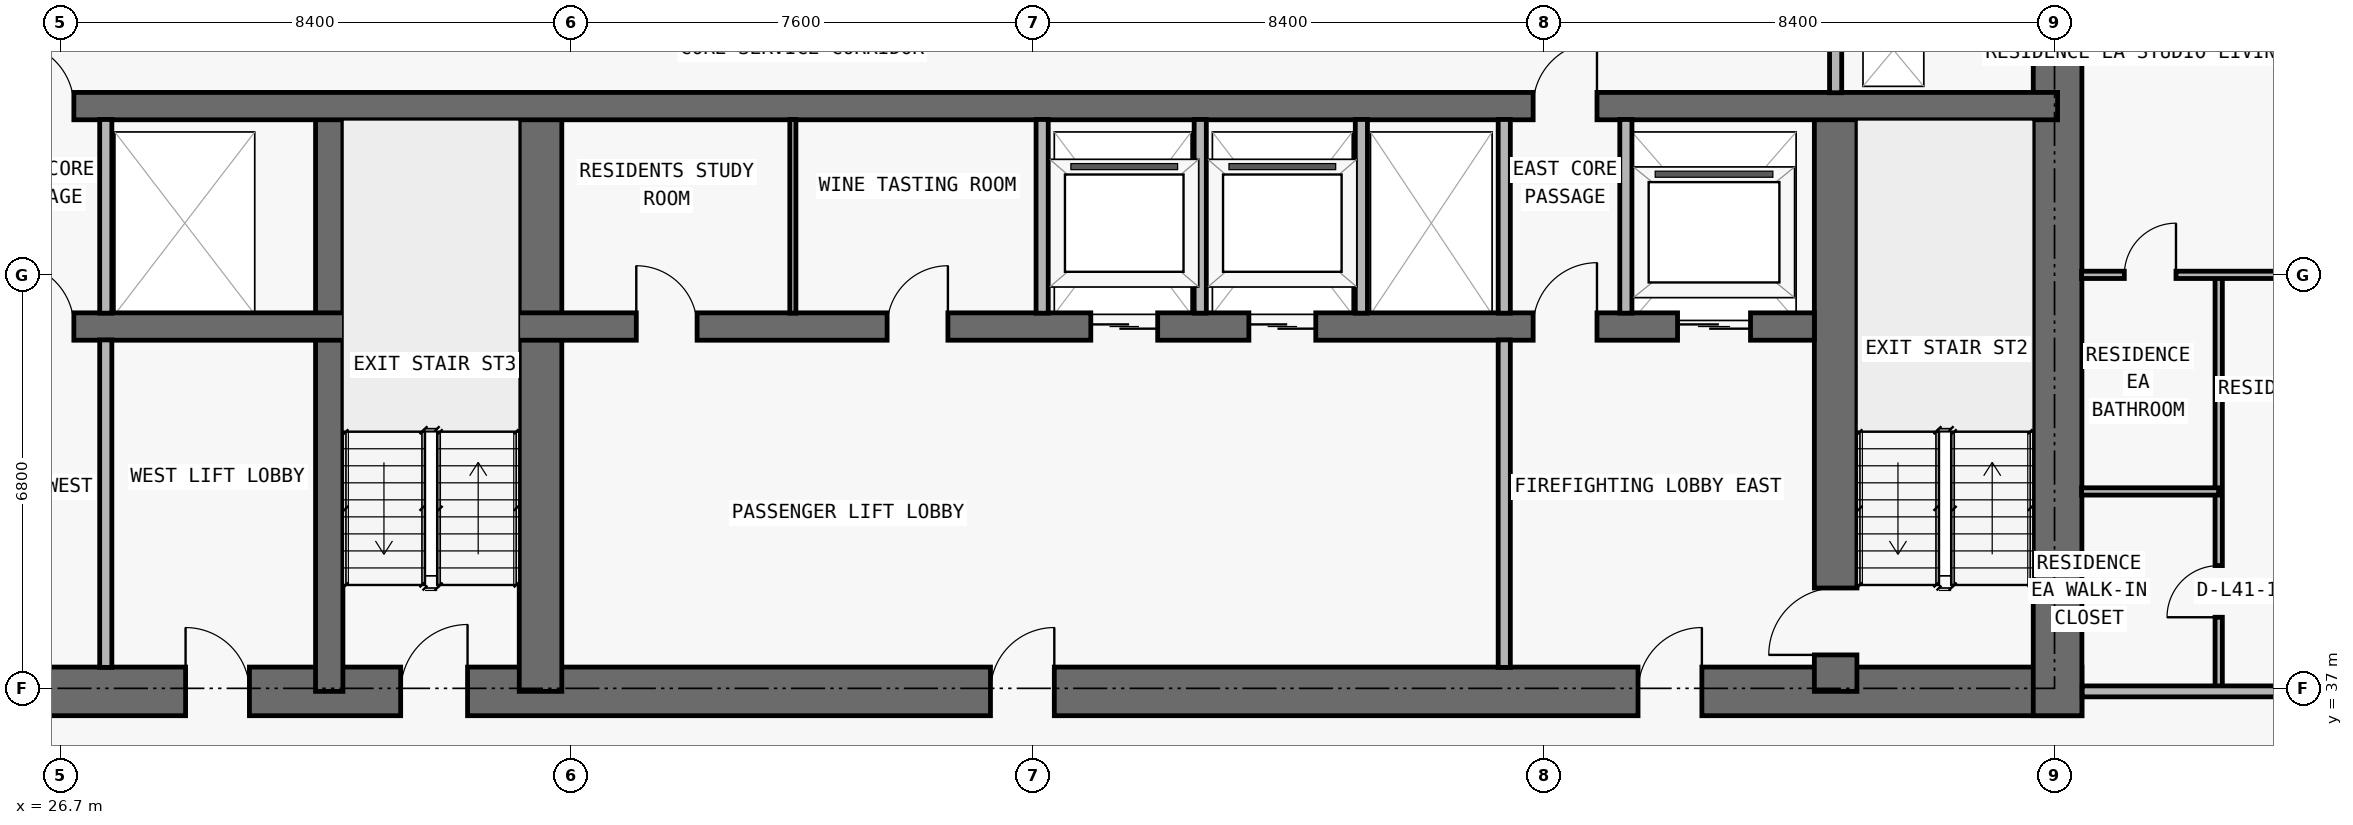
"""IFC4 building model, lengths in metres.
Left out: names, types, materials, properties, quantities, classifications, styles, units other than length and angle.
Written with IfcOpenShell. Run it as: python <this file> out.ifc"""

import sys

from ifc_helpers import new_model, si_unit, direction, frame, frame_2d, origin, place, context, subcontext, project, spatial, rectangle, extrude, element, fill, save


model = new_model("IFC4")
c1 = context("Model", 3, precision=1e-05, world=origin(), true_north=direction((0.0, 1.0)))
c2 = subcontext(c1, "Body", "Model", "MODEL_VIEW")
j1 = project(units=[si_unit("LENGTHUNIT", "METRE"), si_unit("PLANEANGLEUNIT", "RADIAN")], contexts=[c1])
p1 = place(None, origin())
s1 = spatial("IfcSite", under=j1, at=p1, CompositionType="ELEMENT")
p2 = place(p1, origin())
s2 = spatial("IfcBuilding", under=s1, at=p2, CompositionType="ELEMENT")
p3 = place(p2, frame((0.0, 0.0, 148.8)))
s3 = spatial("IfcBuildingStorey", under=s2, at=p3, CompositionType="ELEMENT", Elevation=148.8)
p4 = place(p3, frame((17.85, 36.95, 0.0), z_axis=(0.0, 0.0, 1.0), x_axis=(1.0, 0.0, 0.0)))
e1 = element("IfcWall", 1, at=p4, inside=s3, PredefinedType="SHEAR", context=c2, shape_type="SweptSolid", body=[
    extrude(rectangle(XDim=42.1, YDim=0.8, at=frame_2d((21.05, 0.0))), origin(), (0.0, 0.0, 1.0), 3.0),
])
p5 = place(p4, frame((14.45, 0.0, 0.0)))
e2 = element("IfcOpeningElement", 2, at=p5, cuts=e1, PredefinedType="OPENING", context=c2, shape_type="SweptSolid", body=[
    extrude(rectangle(XDim=1.1, YDim=2.15, at=frame_2d((0.55, 1.075))), frame((0.0, 0.41, 0.0), z_axis=(0.0, -1.0, 0.0), x_axis=(1.0, 0.0, 0.0)), (0.0, 0.0, 1.0), 0.82),
])
p6 = place(p4, frame((6.3, 0.0, 0.0)))
e3 = element("IfcOpeningElement", 3, at=p6, cuts=e1, PredefinedType="OPENING", context=c2, shape_type="SweptSolid", body=[
    extrude(rectangle(XDim=1.05, YDim=2.15, at=frame_2d((0.525, 1.075))), frame((0.0, 0.41, 0.0), z_axis=(0.0, -1.0, 0.0), x_axis=(1.0, 0.0, 0.0)), (0.0, 0.0, 1.0), 0.82),
])
p7 = place(p4, frame((34.8, 0.0, 0.0)))
e4 = element("IfcOpeningElement", 4, at=p7, cuts=e1, PredefinedType="OPENING", context=c2, shape_type="SweptSolid", body=[
    extrude(rectangle(XDim=1.05, YDim=2.15, at=frame_2d((0.525, 1.075))), frame((0.0, 0.41, 0.0), z_axis=(0.0, -1.0, 0.0), x_axis=(1.0, 0.0, 0.0)), (0.0, 0.0, 1.0), 0.82),
])
p8 = place(p4, frame((10.913, 0.0, 0.0)))
e5 = element("IfcOpeningElement", 5, at=p8, cuts=e1, PredefinedType="OPENING", context=c2, shape_type="SweptSolid", body=[
    extrude(rectangle(XDim=1.05, YDim=2.15, at=frame_2d((0.525, 1.075))), frame((0.0, 0.41, 0.0), z_axis=(0.0, -1.0, 0.0), x_axis=(1.0, 0.0, 0.0)), (0.0, 0.0, 1.0), 0.82),
])
p9 = place(p4, frame((24.15, 0.0, 0.0)))
e6 = element("IfcOpeningElement", 6, at=p9, cuts=e1, PredefinedType="OPENING", context=c2, shape_type="SweptSolid", body=[
    extrude(rectangle(XDim=1.05, YDim=2.15, at=frame_2d((0.525, 1.075))), frame((0.0, 0.41, 0.0), z_axis=(0.0, -1.0, 0.0), x_axis=(1.0, 0.0, 0.0)), (0.0, 0.0, 1.0), 0.82),
])
p10 = place(p3, frame((59.55, 36.55, 0.0), z_axis=(0.0, 0.0, 1.0), x_axis=(0.0, 1.0, 0.0)))
e7 = element("IfcWall", 7, at=p10, inside=s3, PredefinedType="SHEAR", context=c2, shape_type="SweptSolid", body=[
    extrude(rectangle(XDim=14.05, YDim=0.8, at=frame_2d((7.025, 0.0))), origin(), (0.0, 0.0, 1.0), 3.0),
])
p11 = place(p3, frame((55.9, 36.95, 0.0), z_axis=(0.0, 0.0, 1.0), x_axis=(0.0, 1.0, 0.0)))
e8 = element("IfcWall", 8, at=p11, inside=s3, PredefinedType="SHEAR", context=c2, shape_type="SweptSolid", body=[
    extrude(rectangle(XDim=9.625, YDim=0.7, at=frame_2d((4.812, 0.0))), origin(), (0.0, 0.0, 1.0), 3.0),
])
p12 = place(p11, frame((0.6, 0.0, 0.0)))
e9 = element("IfcOpeningElement", 9, at=p12, cuts=e8, PredefinedType="OPENING", context=c2, shape_type="SweptSolid", body=[
    extrude(rectangle(XDim=1.1, YDim=2.15, at=frame_2d((0.55, 1.075))), frame((0.0, 0.36, 0.0), z_axis=(0.0, -1.0, 0.0), x_axis=(1.0, 0.0, 0.0)), (0.0, 0.0, 1.0), 0.72),
])
p13 = place(p3, frame((31.125, 36.95, 0.0), z_axis=(0.0, 0.0, 1.0), x_axis=(0.0, 1.0, 0.0)))
e10 = element("IfcWall", 10, at=p13, inside=s3, PredefinedType="SHEAR", context=c2, shape_type="SweptSolid", body=[
    extrude(rectangle(XDim=9.625, YDim=0.45, at=frame_2d((4.812, 0.0))), origin(), (0.0, 0.0, 1.0), 3.0),
])
p14 = place(p3, frame((34.6, 36.95, 0.0), z_axis=(0.0, 0.0, 1.0), x_axis=(0.0, 1.0, 0.0)))
e11 = element("IfcWall", 11, at=p14, inside=s3, PredefinedType="SHEAR", context=c2, shape_type="SweptSolid", body=[
    extrude(rectangle(XDim=9.625, YDim=0.7, at=frame_2d((4.812, 0.0))), origin(), (0.0, 0.0, 1.0), 3.0),
])
p15 = place(p3, frame((22.25, 42.95, 0.0), z_axis=(0.0, 0.0, 1.0), x_axis=(1.0, 0.0, 0.0)))
e12 = element("IfcWall", 12, at=p15, inside=s3, PredefinedType="SHEAR", context=c2, shape_type="SweptSolid", body=[
    extrude(rectangle(XDim=33.3, YDim=0.45, at=frame_2d((16.65, 0.0))), origin(), (0.0, 0.0, 1.0), 3.0),
])
p16 = place(p15, frame((1.05, 0.0, 0.0)))
e13 = element("IfcOpeningElement", 13, at=p16, cuts=e12, PredefinedType="OPENING", context=c2, shape_type="SweptSolid", body=[
    extrude(rectangle(XDim=1.2, YDim=2.2, at=frame_2d((0.6, 1.1))), frame((0.0, 0.235, 0.0), z_axis=(0.0, -1.0, 0.0), x_axis=(1.0, 0.0, 0.0)), (0.0, 0.0, 1.0), 0.47),
])
p17 = place(p15, frame((31.05, 0.0, 0.0)))
e14 = element("IfcOpeningElement", 14, at=p17, cuts=e12, PredefinedType="OPENING", context=c2, shape_type="SweptSolid", body=[
    extrude(rectangle(XDim=1.2, YDim=2.2, at=frame_2d((0.6, 1.1))), frame((0.0, 0.235, 0.0), z_axis=(0.0, -1.0, 0.0), x_axis=(1.0, 0.0, 0.0)), (0.0, 0.0, 1.0), 0.47),
])
p18 = place(p15, frame((21.4, 0.0, 0.0)))
e15 = element("IfcOpeningElement", 15, at=p18, cuts=e12, PredefinedType="OPENING", context=c2, shape_type="SweptSolid", body=[
    extrude(rectangle(XDim=1.1, YDim=2.2, at=frame_2d((0.55, 1.1))), frame((0.0, 0.235, 0.0), z_axis=(0.0, -1.0, 0.0), x_axis=(1.0, 0.0, 0.0)), (0.0, 0.0, 1.0), 0.47),
])
p19 = place(p15, frame((24.0, 0.0, 0.0)))
e16 = element("IfcOpeningElement", 16, at=p19, cuts=e12, PredefinedType="OPENING", context=c2, shape_type="SweptSolid", body=[
    extrude(rectangle(XDim=1.1, YDim=2.2, at=frame_2d((0.55, 1.1))), frame((0.0, 0.235, 0.0), z_axis=(0.0, -1.0, 0.0), x_axis=(1.0, 0.0, 0.0)), (0.0, 0.0, 1.0), 0.47),
])
p20 = place(p15, frame((3.625, 0.0, 0.0)))
e17 = element("IfcOpeningElement", 17, at=p20, cuts=e12, PredefinedType="OPENING", context=c2, shape_type="SweptSolid", body=[
    extrude(rectangle(XDim=1.05, YDim=2.15, at=frame_2d((0.525, 1.075))), frame((0.0, 0.235, 0.0), z_axis=(0.0, -1.0, 0.0), x_axis=(1.0, 0.0, 0.0)), (0.0, 0.0, 1.0), 0.47),
])
p21 = place(p15, frame((28.675, 0.0, 0.0)))
e18 = element("IfcOpeningElement", 18, at=p21, cuts=e12, PredefinedType="OPENING", context=c2, shape_type="SweptSolid", body=[
    extrude(rectangle(XDim=1.05, YDim=2.15, at=frame_2d((0.525, 1.075))), frame((0.0, 0.235, 0.0), z_axis=(0.0, -1.0, 0.0), x_axis=(1.0, 0.0, 0.0)), (0.0, 0.0, 1.0), 0.47),
])
p22 = place(p15, frame((13.925, 0.0, 0.0)))
e19 = element("IfcOpeningElement", 19, at=p22, cuts=e12, PredefinedType="OPENING", context=c2, shape_type="SweptSolid", body=[
    extrude(rectangle(XDim=1.0, YDim=2.2, at=frame_2d((0.5, 1.1))), frame((0.0, 0.235, 0.0), z_axis=(0.0, -1.0, 0.0), x_axis=(1.0, 0.0, 0.0)), (0.0, 0.0, 1.0), 0.47),
])
p23 = place(p15, frame((18.05, 0.0, 0.0)))
e20 = element("IfcOpeningElement", 20, at=p23, cuts=e12, PredefinedType="OPENING", context=c2, shape_type="SweptSolid", body=[
    extrude(rectangle(XDim=1.0, YDim=2.2, at=frame_2d((0.5, 1.1))), frame((0.0, 0.235, 0.0), z_axis=(0.0, -1.0, 0.0), x_axis=(1.0, 0.0, 0.0)), (0.0, 0.0, 1.0), 0.47),
])
p24 = place(p3, frame((18.25, 46.575, 0.0), z_axis=(0.0, 0.0, 1.0), x_axis=(1.0, 0.0, 0.0)))
e21 = element("IfcWall", 21, at=p24, inside=s3, PredefinedType="SHEAR", context=c2, shape_type="SweptSolid", body=[
    extrude(rectangle(XDim=41.3, YDim=0.45, at=frame_2d((20.65, 0.0))), origin(), (0.0, 0.0, 1.0), 3.0),
])
p25 = place(p24, frame((7.625, 0.0, 0.0)))
e22 = element("IfcOpeningElement", 22, at=p25, cuts=e21, PredefinedType="OPENING", context=c2, shape_type="SweptSolid", body=[
    extrude(rectangle(XDim=1.05, YDim=2.15, at=frame_2d((0.525, 1.075))), frame((0.0, 0.235, 0.0), z_axis=(0.0, -1.0, 0.0), x_axis=(1.0, 0.0, 0.0)), (0.0, 0.0, 1.0), 0.47),
])
p26 = place(p24, frame((32.675, 0.0, 0.0)))
e23 = element("IfcOpeningElement", 23, at=p26, cuts=e21, PredefinedType="OPENING", context=c2, shape_type="SweptSolid", body=[
    extrude(rectangle(XDim=1.05, YDim=2.15, at=frame_2d((0.525, 1.075))), frame((0.0, 0.235, 0.0), z_axis=(0.0, -1.0, 0.0), x_axis=(1.0, 0.0, 0.0)), (0.0, 0.0, 1.0), 0.47),
])
p27 = place(p3, frame((27.45, 37.345, 0.0), z_axis=(0.0, 0.0, 1.0), x_axis=(0.0, 1.0, 0.0)))
e24 = element("IfcWall", 24, at=p27, inside=s3, PredefinedType="PARTITIONING", context=c2, shape_type="SweptSolid", body=[
    extrude(rectangle(XDim=5.385, YDim=0.2, at=frame_2d((2.692, 0.0))), origin(), (0.0, 0.0, 1.0), 3.0),
])
p28 = place(p3, frame((27.45, 43.17, 0.0), z_axis=(0.0, 0.0, 1.0), x_axis=(0.0, 1.0, 0.0)))
e25 = element("IfcWall", 25, at=p28, inside=s3, PredefinedType="PARTITIONING", context=c2, shape_type="SweptSolid", body=[
    extrude(rectangle(XDim=3.185, YDim=0.2, at=frame_2d((1.593, 0.0))), origin(), (0.0, 0.0, 1.0), 3.0),
])
p29 = place(p3, frame((38.75, 43.17, 0.0), z_axis=(0.0, 0.0, 1.0), x_axis=(0.0, 1.0, 0.0)))
e26 = element("IfcWall", 26, at=p29, inside=s3, PredefinedType="MOVABLE", context=c2, shape_type="SweptSolid", body=[
    extrude(rectangle(XDim=3.185, YDim=0.1, at=frame_2d((1.593, 0.0))), origin(), (0.0, 0.0, 1.0), 3.0),
])
for number, where, z_axis, x_axis in (
    (27, (42.85, 43.17, 0.0), (0.0, 0.0, 1.0), (0.0, 1.0, 0.0)),
    (28, (45.45, 43.17, 0.0), (0.0, 0.0, 1.0), (0.0, 1.0, 0.0)),
    (29, (48.1, 43.17, 0.0), (0.0, 0.0, 1.0), (0.0, 1.0, 0.0)),
):
    element("IfcWall", number, at=place(p3, frame(where, z_axis=z_axis, x_axis=x_axis)), inside=s3, PredefinedType="PARTITIONING", context=c2, shape_type="SweptSolid", body=[
        extrude(rectangle(XDim=3.185, YDim=0.2, at=frame_2d((1.593, 0.0))), origin(), (0.0, 0.0, 1.0), 3.0),
    ])
p30 = place(p3, frame((50.45, 37.345, 0.0), z_axis=(0.0, 0.0, 1.0), x_axis=(0.0, 1.0, 0.0)))
e30 = element("IfcWall", 30, at=p30, inside=s3, PredefinedType="PARTITIONING", context=c2, shape_type="SweptSolid", body=[
    extrude(rectangle(XDim=5.385, YDim=0.2, at=frame_2d((2.692, 0.0))), origin(), (0.0, 0.0, 1.0), 3.0),
])
for number, where, z_axis, x_axis in (
    (31, (50.45, 43.17, 0.0), (0.0, 0.0, 1.0), (0.0, 1.0, 0.0)),
    (32, (52.45, 43.17, 0.0), (0.0, 0.0, 1.0), (0.0, 1.0, 0.0)),
):
    element("IfcWall", number, at=place(p3, frame(where, z_axis=z_axis, x_axis=x_axis)), inside=s3, PredefinedType="PARTITIONING", context=c2, shape_type="SweptSolid", body=[
        extrude(rectangle(XDim=3.185, YDim=0.2, at=frame_2d((1.593, 0.0))), origin(), (0.0, 0.0, 1.0), 3.0),
    ])
p31 = place(p3, frame((55.9, 46.795, 0.0), z_axis=(0.0, 0.0, 1.0), x_axis=(0.0, 1.0, 0.0)))
e33 = element("IfcWall", 33, at=p31, inside=s3, PredefinedType="PARTITIONING", context=c2, shape_type="SweptSolid", body=[
    extrude(rectangle(XDim=3.16, YDim=0.2, at=frame_2d((1.58, 0.0))), origin(), (0.0, 0.0, 1.0), 3.0),
])
p32 = place(p3, frame((62.2, 36.95, 0.0), z_axis=(0.0, 0.0, 1.0), x_axis=(0.0, 1.0, 0.0)))
e34 = element("IfcWall", 34, at=p32, inside=s3, PredefinedType="PARTITIONING", context=c2, shape_type="SweptSolid", body=[
    extrude(rectangle(XDim=6.85, YDim=0.12, at=frame_2d((3.425, 0.0))), origin(), (0.0, 0.0, 1.0), 3.0),
])
p33 = place(p32, frame((1.219, 0.0, 0.0)))
e35 = element("IfcOpeningElement", 35, at=p33, cuts=e34, PredefinedType="OPENING", context=c2, shape_type="SweptSolid", body=[
    extrude(rectangle(XDim=0.85, YDim=2.1, at=frame_2d((0.425, 1.05))), frame((0.0, 0.07, 0.0), z_axis=(0.0, -1.0, 0.0), x_axis=(1.0, 0.0, 0.0)), (0.0, 0.0, 1.0), 0.14),
])
p34 = place(p3, frame((59.955, 36.95, 0.0), z_axis=(0.0, 0.0, 1.0), x_axis=(1.0, 0.0, 0.0)))
e36 = element("IfcWall", 36, at=p34, inside=s3, PredefinedType="PARTITIONING", context=c2, shape_type="SweptSolid", body=[
    extrude(rectangle(XDim=10.145, YDim=0.18, at=frame_2d((5.073, 0.0))), origin(), (0.0, 0.0, 1.0), 3.0),
])
p35 = place(p34, frame((3.957, 0.0, 0.0)))
e37 = element("IfcOpeningElement", 37, at=p35, cuts=e36, PredefinedType="OPENING", context=c2, shape_type="SweptSolid", body=[
    extrude(rectangle(XDim=1.0, YDim=2.2, at=frame_2d((0.5, 1.1))), frame((0.0, 0.1, 0.0), z_axis=(0.0, -1.0, 0.0), x_axis=(1.0, 0.0, 0.0)), (0.0, 0.0, 1.0), 0.2),
])
p36 = place(p3, frame((59.945, 40.238, 0.0), z_axis=(0.0, 0.0, 1.0), x_axis=(1.0, 0.0, 0.0)))
e38 = element("IfcWall", 38, at=p36, inside=s3, PredefinedType="PARTITIONING", context=c2, shape_type="SweptSolid", body=[
    extrude(rectangle(XDim=2.255, YDim=0.12, at=frame_2d((1.127, 0.0))), origin(), (0.0, 0.0, 1.0), 3.0),
])
p37 = place(p3, frame((59.945, 43.8, 0.0), z_axis=(0.0, 0.0, 1.0), x_axis=(1.0, 0.0, 0.0)))
e39 = element("IfcWall", 39, at=p37, inside=s3, PredefinedType="PARTITIONING", context=c2, shape_type="SweptSolid", body=[
    extrude(rectangle(XDim=13.66, YDim=0.12, at=frame_2d((6.83, 0.0))), origin(), (0.0, 0.0, 1.0), 2.289),
])
p38 = place(p37, frame((4.017, 0.0, 0.0)))
e40 = element("IfcOpeningElement", 40, at=p38, cuts=e39, PredefinedType="OPENING", context=c2, shape_type="SweptSolid", body=[
    extrude(rectangle(XDim=0.9, YDim=2.15, at=frame_2d((0.45, 1.075))), frame((0.0, 0.07, 0.0), z_axis=(0.0, -1.0, 0.0), x_axis=(1.0, 0.0, 0.0)), (0.0, 0.0, 1.0), 0.14),
])
p39 = place(p37, frame((0.702, 0.0, 0.0)))
e41 = element("IfcOpeningElement", 41, at=p39, cuts=e39, PredefinedType="OPENING", context=c2, shape_type="SweptSolid", body=[
    extrude(rectangle(XDim=0.85, YDim=2.1, at=frame_2d((0.425, 1.05))), frame((0.0, 0.07, 0.0), z_axis=(0.0, -1.0, 0.0), x_axis=(1.0, 0.0, 0.0)), (0.0, 0.0, 1.0), 0.14),
])
p40 = place(p17, origin())
e42 = element("IfcDoor", 42, at=p40, inside=s3, OperationType="DOUBLE_DOOR_SLIDING", PredefinedType="DOOR", context=c2, shape_type="SweptSolid", body=[
    extrude(rectangle(XDim=1.2, YDim=2.2, at=frame_2d((0.6, 1.1))), frame((0.0, 0.025, 0.0), z_axis=(0.0, -1.0, 0.0), x_axis=(1.0, 0.0, 0.0)), (0.0, 0.0, 1.0), 0.05),
])
fill(e14, e42)
p41 = place(p18, origin())
e43 = element("IfcDoor", 43, at=p41, inside=s3, OperationType="DOUBLE_DOOR_SLIDING", PredefinedType="DOOR", context=c2, shape_type="SweptSolid", body=[
    extrude(rectangle(XDim=1.1, YDim=2.2, at=frame_2d((0.55, 1.1))), frame((0.0, 0.025, 0.0), z_axis=(0.0, -1.0, 0.0), x_axis=(1.0, 0.0, 0.0)), (0.0, 0.0, 1.0), 0.05),
])
fill(e15, e43)
p42 = place(p19, origin())
e44 = element("IfcDoor", 44, at=p42, inside=s3, OperationType="DOUBLE_DOOR_SLIDING", PredefinedType="DOOR", context=c2, shape_type="SweptSolid", body=[
    extrude(rectangle(XDim=1.1, YDim=2.2, at=frame_2d((0.55, 1.1))), frame((0.0, 0.025, 0.0), z_axis=(0.0, -1.0, 0.0), x_axis=(1.0, 0.0, 0.0)), (0.0, 0.0, 1.0), 0.05),
])
fill(e16, e44)
p43 = place(p5, origin())
e45 = element("IfcDoor", 45, at=p43, inside=s3, OperationType="SINGLE_SWING_RIGHT", PredefinedType="DOOR", context=c2, shape_type="SweptSolid", body=[
    extrude(rectangle(XDim=1.1, YDim=2.15, at=frame_2d((0.55, 1.075))), frame((0.0, 0.025, 0.0), z_axis=(0.0, -1.0, 0.0), x_axis=(1.0, 0.0, 0.0)), (0.0, 0.0, 1.0), 0.05),
])
fill(e2, e45)
p44 = place(p20, origin())
e46 = element("IfcDoor", 46, at=p44, inside=s3, OperationType="SINGLE_SWING_LEFT", PredefinedType="DOOR", context=c2, shape_type="SweptSolid", body=[
    extrude(rectangle(XDim=1.05, YDim=2.15, at=frame_2d((0.525, 1.075))), frame((0.0, 0.025, 0.0), z_axis=(0.0, -1.0, 0.0), x_axis=(1.0, 0.0, 0.0)), (0.0, 0.0, 1.0), 0.05),
])
fill(e17, e46)
p45 = place(p7, origin())
e47 = element("IfcDoor", 47, at=p45, inside=s3, OperationType="SINGLE_SWING_RIGHT", PredefinedType="DOOR", context=c2, shape_type="SweptSolid", body=[
    extrude(rectangle(XDim=1.05, YDim=2.15, at=frame_2d((0.525, 1.075))), frame((0.0, 0.025, 0.0), z_axis=(0.0, -1.0, 0.0), x_axis=(1.0, 0.0, 0.0)), (0.0, 0.0, 1.0), 0.05),
])
fill(e4, e47)
p46 = place(p12, origin())
e48 = element("IfcDoor", 48, at=p46, inside=s3, OperationType="SINGLE_SWING_LEFT", PredefinedType="DOOR", context=c2, shape_type="SweptSolid", body=[
    extrude(rectangle(XDim=1.1, YDim=2.15, at=frame_2d((0.55, 1.075))), frame((0.0, 0.025, 0.0), z_axis=(0.0, -1.0, 0.0), x_axis=(1.0, 0.0, 0.0)), (0.0, 0.0, 1.0), 0.05),
])
fill(e9, e48)
p47 = place(p21, origin())
e49 = element("IfcDoor", 49, at=p47, inside=s3, OperationType="SINGLE_SWING_RIGHT", PredefinedType="DOOR", context=c2, shape_type="SweptSolid", body=[
    extrude(rectangle(XDim=1.05, YDim=2.15, at=frame_2d((0.525, 1.075))), frame((0.0, 0.025, 0.0), z_axis=(0.0, -1.0, 0.0), x_axis=(1.0, 0.0, 0.0)), (0.0, 0.0, 1.0), 0.05),
])
fill(e18, e49)
p48 = place(p8, origin())
e50 = element("IfcDoor", 50, at=p48, inside=s3, OperationType="SINGLE_SWING_LEFT", PredefinedType="DOOR", context=c2, shape_type="SweptSolid", body=[
    extrude(rectangle(XDim=1.05, YDim=2.15, at=frame_2d((0.525, 1.075))), frame((0.0, 0.025, 0.0), z_axis=(0.0, -1.0, 0.0), x_axis=(1.0, 0.0, 0.0)), (0.0, 0.0, 1.0), 0.05),
])
fill(e5, e50)
p49 = place(p9, origin())
e51 = element("IfcDoor", 51, at=p49, inside=s3, OperationType="SINGLE_SWING_RIGHT", PredefinedType="DOOR", context=c2, shape_type="SweptSolid", body=[
    extrude(rectangle(XDim=1.05, YDim=2.15, at=frame_2d((0.525, 1.075))), frame((0.0, 0.025, 0.0), z_axis=(0.0, -1.0, 0.0), x_axis=(1.0, 0.0, 0.0)), (0.0, 0.0, 1.0), 0.05),
])
fill(e6, e51)
p50 = place(p22, origin())
e52 = element("IfcDoor", 52, at=p50, inside=s3, OperationType="SINGLE_SWING_LEFT", PredefinedType="DOOR", context=c2, shape_type="SweptSolid", body=[
    extrude(rectangle(XDim=1.0, YDim=2.2, at=frame_2d((0.5, 1.1))), frame((0.0, 0.025, 0.0), z_axis=(0.0, -1.0, 0.0), x_axis=(1.0, 0.0, 0.0)), (0.0, 0.0, 1.0), 0.05),
])
fill(e19, e52)
p51 = place(p23, origin())
e53 = element("IfcDoor", 53, at=p51, inside=s3, OperationType="SINGLE_SWING_RIGHT", PredefinedType="DOOR", context=c2, shape_type="SweptSolid", body=[
    extrude(rectangle(XDim=1.0, YDim=2.2, at=frame_2d((0.5, 1.1))), frame((0.0, 0.025, 0.0), z_axis=(0.0, -1.0, 0.0), x_axis=(1.0, 0.0, 0.0)), (0.0, 0.0, 1.0), 0.05),
])
fill(e20, e53)
p52 = place(p25, origin())
e54 = element("IfcDoor", 54, at=p52, inside=s3, OperationType="SINGLE_SWING_LEFT", PredefinedType="DOOR", context=c2, shape_type="SweptSolid", body=[
    extrude(rectangle(XDim=1.05, YDim=2.15, at=frame_2d((0.525, 1.075))), frame((0.0, 0.025, 0.0), z_axis=(0.0, -1.0, 0.0), x_axis=(1.0, 0.0, 0.0)), (0.0, 0.0, 1.0), 0.05),
])
fill(e22, e54)
p53 = place(p26, origin())
e55 = element("IfcDoor", 55, at=p53, inside=s3, OperationType="SINGLE_SWING_RIGHT", PredefinedType="DOOR", context=c2, shape_type="SweptSolid", body=[
    extrude(rectangle(XDim=1.05, YDim=2.15, at=frame_2d((0.525, 1.075))), frame((0.0, 0.025, 0.0), z_axis=(0.0, -1.0, 0.0), x_axis=(1.0, 0.0, 0.0)), (0.0, 0.0, 1.0), 0.05),
])
fill(e23, e55)
p54 = place(p33, origin())
e56 = element("IfcDoor", 56, at=p54, inside=s3, OperationType="SINGLE_SWING_LEFT", PredefinedType="DOOR", context=c2, shape_type="SweptSolid", body=[
    extrude(rectangle(XDim=0.85, YDim=2.1, at=frame_2d((0.425, 1.05))), frame((0.0, 0.025, 0.0), z_axis=(0.0, -1.0, 0.0), x_axis=(1.0, 0.0, 0.0)), (0.0, 0.0, 1.0), 0.05),
])
fill(e35, e56)
p55 = place(p39, origin())
e57 = element("IfcDoor", 57, at=p55, inside=s3, OperationType="SINGLE_SWING_RIGHT", PredefinedType="DOOR", context=c2, shape_type="SweptSolid", body=[
    extrude(rectangle(XDim=0.85, YDim=2.1, at=frame_2d((0.425, 1.05))), frame((0.0, 0.025, 0.0), z_axis=(0.0, -1.0, 0.0), x_axis=(1.0, 0.0, 0.0)), (0.0, 0.0, 1.0), 0.05),
])
fill(e41, e57)
save(model, sys.argv[1])
